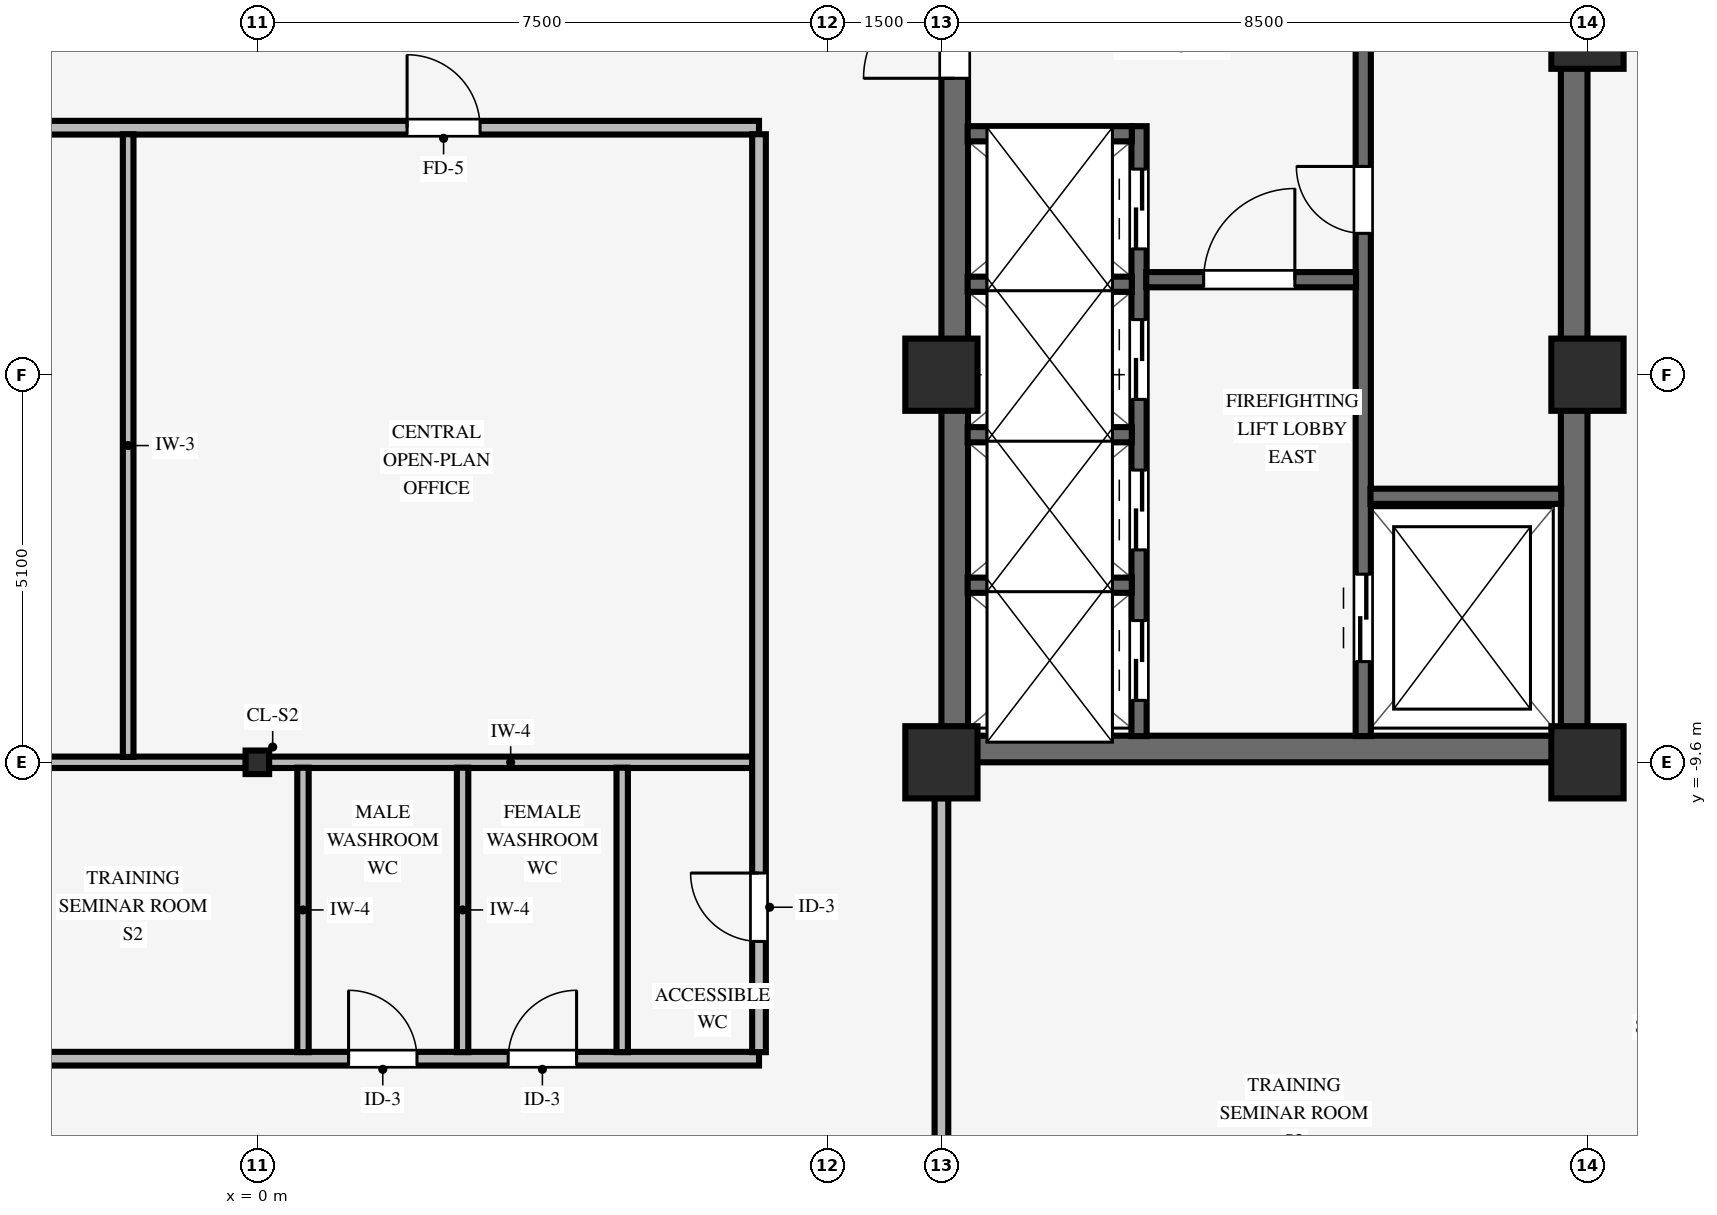
"""IFC4 building model, lengths in metres.
Left out: names, types, materials, properties, quantities, classifications, styles, units other than length and angle.
Written with IfcOpenShell. Run it as: python <this file> out.ifc"""

import sys

from ifc_helpers import new_model, si_unit, direction, frame, frame_2d, origin, origin_2d, place, context, subcontext, project, spatial, rectangle, i_section, extrude, source, transform, mapped, element, fill, save


model = new_model("IFC4")
c1 = context("Model", 3, precision=1e-05, world=origin(), true_north=direction((0.0, 1.0)))
c2 = subcontext(c1, "Body", "Model", "MODEL_VIEW")
j1 = project(units=[si_unit("LENGTHUNIT", "METRE"), si_unit("PLANEANGLEUNIT", "RADIAN")], contexts=[c1])
p1 = place(None, origin())
s1 = spatial("IfcSite", under=j1, at=p1, CompositionType="ELEMENT")
p2 = place(p1, origin())
s2 = spatial("IfcBuilding", under=s1, at=p2, CompositionType="ELEMENT")
p3 = place(p2, frame((0.0, 0.0, 212.8)))
s3 = spatial("IfcBuildingStorey", under=s2, at=p3, CompositionType="ELEMENT", Elevation=212.8)
p4 = place(p3, frame((9.0, -9.425, 0.0), z_axis=(0.0, 0.0, 1.0), x_axis=(1.0, 0.0, 0.0)))
e1 = element("IfcWall", 1, at=p4, inside=s3, PredefinedType="SHEAR", context=c2, shape_type="SweptSolid", body=[
    extrude(rectangle(XDim=8.5, YDim=0.35, at=frame_2d((4.25, 0.0))), origin(), (0.0, 0.0, 1.0), 3.37),
])
p5 = place(p3, frame((9.175, -9.255, 0.0), z_axis=(0.0, 0.0, 1.0), x_axis=(0.0, 1.0, 0.0)))
e2 = element("IfcWall", 2, at=p5, inside=s3, PredefinedType="SHEAR", context=c2, shape_type="SweptSolid", body=[
    extrude(rectangle(XDim=18.51, YDim=0.35, at=frame_2d((9.255, 0.0))), origin(), (0.0, 0.0, 1.0), 3.37),
])
p6 = place(p5, frame((8.655, 0.0, 0.0)))
e3 = element("IfcOpeningElement", 3, at=p6, cuts=e2, PredefinedType="OPENING", context=c2, shape_type="SweptSolid", body=[
    extrude(rectangle(XDim=1.2, YDim=2.15, at=frame_2d((0.6, 1.075))), frame((0.0, 0.185, 0.0), z_axis=(0.0, -1.0, 0.0), x_axis=(1.0, 0.0, 0.0)), (0.0, 0.0, 1.0), 0.37),
])
p7 = place(p3, frame((17.325, -9.255, 0.0), z_axis=(0.0, 0.0, 1.0), x_axis=(0.0, 1.0, 0.0)))
e4 = element("IfcWall", 4, at=p7, inside=s3, PredefinedType="SHEAR", context=c2, shape_type="SweptSolid", body=[
    extrude(rectangle(XDim=18.51, YDim=0.35, at=frame_2d((9.255, 0.0))), origin(), (0.0, 0.0, 1.0), 3.37),
])
for number, where, z_axis, x_axis in (
    (5, (9.0, -9.6, 0.0), (0.0, 0.0, 1.0), (1.0, 0.0, 0.0)),
    (6, (9.0, -4.5, 0.0), (0.0, 0.0, 1.0), (1.0, 0.0, 0.0)),
    (7, (17.5, -9.6, 0.0), (0.0, 0.0, 1.0), (1.0, 0.0, 0.0)),
    (8, (17.5, -4.5, 0.0), (0.0, 0.0, 1.0), (1.0, 0.0, 0.0)),
    (9, (17.5, 0.0, 0.0), (0.0, 0.0, 1.0), (1.0, 0.0, 0.0)),
):
    element("IfcColumn", number, at=place(p3, frame(where, z_axis=z_axis, x_axis=x_axis)), inside=s3, PredefinedType="COLUMN", context=c2, shape_type="SweptSolid", body=[
        extrude(rectangle(XDim=0.95, YDim=0.95, at=origin_2d()), origin(), (0.0, 0.0, 1.0), 3.37),
    ])
p8 = place(p3, frame((0.0, -9.6, 0.0), z_axis=(0.0, 0.0, 1.0), x_axis=(1.0, 0.0, 0.0)))
e10 = element("IfcColumn", 10, at=p8, inside=s3, PredefinedType="COLUMN", context=c2, shape_type="SweptSolid", body=[
    extrude(i_section(OverallWidth=0.31, OverallDepth=0.31, WebThickness=0.015, FlangeThickness=0.015, FilletRadius=0.015, at=origin_2d()), origin(), (0.0, 0.0, 1.0), 3.37),
])
p9 = place(p3, frame((14.55, -9.255, 0.0), z_axis=(0.0, 0.0, 1.0), x_axis=(0.0, 1.0, 0.0)))
e11 = element("IfcWall", 11, at=p9, inside=s3, PredefinedType="SHEAR", context=c2, shape_type="SweptSolid", body=[
    extrude(rectangle(XDim=10.16, YDim=0.2, at=frame_2d((5.08, 0.0))), origin(), (0.0, 0.0, 1.0), 3.37),
])
p10 = place(p9, frame((6.615, 0.0, 0.0)))
e12 = element("IfcOpeningElement", 12, at=p10, cuts=e11, PredefinedType="OPENING", context=c2, shape_type="SweptSolid", body=[
    extrude(rectangle(XDim=0.88, YDim=2.1, at=frame_2d((0.44, 1.05))), frame((0.0, 0.11, 0.0), z_axis=(0.0, -1.0, 0.0), x_axis=(1.0, 0.0, 0.0)), (0.0, 0.0, 1.0), 0.22),
])
p11 = place(p9, frame((0.98, 0.0, 0.0)))
e13 = element("IfcOpeningElement", 13, at=p11, cuts=e11, PredefinedType="OPENING", context=c2, shape_type="SweptSolid", body=[
    extrude(rectangle(XDim=1.15, YDim=2.15, at=frame_2d((0.575, 1.075))), frame((0.0, 0.11, 0.0), z_axis=(0.0, -1.0, 0.0), x_axis=(1.0, 0.0, 0.0)), (0.0, 0.0, 1.0), 0.22),
])
p12 = place(p3, frame((14.645, -6.1, 0.0), z_axis=(0.0, 0.0, 1.0), x_axis=(1.0, 0.0, 0.0)))
e14 = element("IfcWall", 14, at=p12, inside=s3, PredefinedType="SHEAR", context=c2, shape_type="SweptSolid", body=[
    extrude(rectangle(XDim=2.51, YDim=0.2, at=frame_2d((1.255, 0.0))), origin(), (0.0, 0.0, 1.0), 3.37),
])
p13 = place(p3, frame((11.6, -9.255, 0.0), z_axis=(0.0, 0.0, 1.0), x_axis=(0.0, 1.0, 0.0)))
e15 = element("IfcWall", 15, at=p13, inside=s3, PredefinedType="SHEAR", context=c2, shape_type="SweptSolid", body=[
    extrude(rectangle(XDim=8.025, YDim=0.2, at=frame_2d((4.012, 0.0))), origin(), (0.0, 0.0, 1.0), 3.37),
])
p14 = place(p13, frame((0.47, 0.0, 0.0)))
e16 = element("IfcOpeningElement", 16, at=p14, cuts=e15, PredefinedType="OPENING", context=c2, shape_type="SweptSolid", body=[
    extrude(rectangle(XDim=1.05, YDim=2.15, at=frame_2d((0.525, 1.075))), frame((0.0, 0.11, 0.0), z_axis=(0.0, -1.0, 0.0), x_axis=(1.0, 0.0, 0.0)), (0.0, 0.0, 1.0), 0.22),
])
p15 = place(p13, frame((2.45, 0.0, 0.0)))
e17 = element("IfcOpeningElement", 17, at=p15, cuts=e15, PredefinedType="OPENING", context=c2, shape_type="SweptSolid", body=[
    extrude(rectangle(XDim=1.05, YDim=2.15, at=frame_2d((0.525, 1.075))), frame((0.0, 0.11, 0.0), z_axis=(0.0, -1.0, 0.0), x_axis=(1.0, 0.0, 0.0)), (0.0, 0.0, 1.0), 0.22),
])
p16 = place(p13, frame((4.43, 0.0, 0.0)))
e18 = element("IfcOpeningElement", 18, at=p16, cuts=e15, PredefinedType="OPENING", context=c2, shape_type="SweptSolid", body=[
    extrude(rectangle(XDim=1.05, YDim=2.15, at=frame_2d((0.525, 1.075))), frame((0.0, 0.11, 0.0), z_axis=(0.0, -1.0, 0.0), x_axis=(1.0, 0.0, 0.0)), (0.0, 0.0, 1.0), 0.22),
])
p17 = place(p13, frame((6.41, 0.0, 0.0)))
e19 = element("IfcOpeningElement", 19, at=p17, cuts=e15, PredefinedType="OPENING", context=c2, shape_type="SweptSolid", body=[
    extrude(rectangle(XDim=1.05, YDim=2.15, at=frame_2d((0.525, 1.075))), frame((0.0, 0.11, 0.0), z_axis=(0.0, -1.0, 0.0), x_axis=(1.0, 0.0, 0.0)), (0.0, 0.0, 1.0), 0.22),
])
p18 = place(p3, frame((11.695, -3.25, 0.0), z_axis=(0.0, 0.0, 1.0), x_axis=(1.0, 0.0, 0.0)))
e20 = element("IfcWall", 20, at=p18, inside=s3, PredefinedType="SHEAR", context=c2, shape_type="SweptSolid", body=[
    extrude(rectangle(XDim=2.76, YDim=0.2, at=frame_2d((1.38, 0.0))), origin(), (0.0, 0.0, 1.0), 3.37),
])
p19 = place(p18, frame((0.755, 0.0, 0.0)))
e21 = element("IfcOpeningElement", 21, at=p19, cuts=e20, PredefinedType="OPENING", context=c2, shape_type="SweptSolid", body=[
    extrude(rectangle(XDim=1.2, YDim=2.15, at=frame_2d((0.6, 1.075))), frame((0.0, 0.11, 0.0), z_axis=(0.0, -1.0, 0.0), x_axis=(1.0, 0.0, 0.0)), (0.0, 0.0, 1.0), 0.22),
])
for number, where, z_axis, x_axis in (
    (22, (9.345, -7.27, 0.0), (0.0, 0.0, 1.0), (1.0, 0.0, 0.0)),
    (23, (9.345, -5.29, 0.0), (0.0, 0.0, 1.0), (1.0, 0.0, 0.0)),
    (24, (9.345, -3.31, 0.0), (0.0, 0.0, 1.0), (1.0, 0.0, 0.0)),
    (25, (9.345, -1.33, 0.0), (0.0, 0.0, 1.0), (1.0, 0.0, 0.0)),
):
    element("IfcWall", number, at=place(p3, frame(where, z_axis=z_axis, x_axis=x_axis)), inside=s3, PredefinedType="SHEAR", context=c2, shape_type="SweptSolid", body=[
        extrude(rectangle(XDim=2.16, YDim=0.2, at=frame_2d((1.08, 0.0))), origin(), (0.0, 0.0, 1.0), 3.37),
    ])
p20 = place(p3, frame((-17.7, -13.5, 0.0), z_axis=(0.0, 0.0, 1.0), x_axis=(1.0, 0.0, 0.0)))
e26 = element("IfcWall", 26, at=p20, inside=s3, PredefinedType="PARTITIONING", context=c2, shape_type="SweptSolid", body=[
    extrude(rectangle(XDim=24.3, YDim=0.18, at=frame_2d((12.15, 0.0))), origin(), (0.0, 0.0, 1.0), 3.008),
])
p21 = place(p20, frame((12.215, 0.0, 0.0)))
e27 = element("IfcOpeningElement", 27, at=p21, cuts=e26, PredefinedType="OPENING", context=c2, shape_type="SweptSolid", body=[
    extrude(rectangle(XDim=0.96, YDim=2.1, at=frame_2d((0.48, 1.05))), frame((0.0, 0.1, 0.0), z_axis=(0.0, -1.0, 0.0), x_axis=(1.0, 0.0, 0.0)), (0.0, 0.0, 1.0), 0.2),
])
p22 = place(p20, frame((3.065, 0.0, 0.0)))
e28 = element("IfcOpeningElement", 28, at=p22, cuts=e26, PredefinedType="OPENING", context=c2, shape_type="SweptSolid", body=[
    extrude(rectangle(XDim=0.96, YDim=2.1, at=frame_2d((0.48, 1.05))), frame((0.0, 0.1, 0.0), z_axis=(0.0, -1.0, 0.0), x_axis=(1.0, 0.0, 0.0)), (0.0, 0.0, 1.0), 0.2),
])
p23 = place(p20, frame((18.9, 0.0, 0.0)))
e29 = element("IfcOpeningElement", 29, at=p23, cuts=e26, PredefinedType="OPENING", context=c2, shape_type="SweptSolid", body=[
    extrude(rectangle(XDim=0.9, YDim=2.1, at=frame_2d((0.45, 1.05))), frame((0.0, 0.1, 0.0), z_axis=(0.0, -1.0, 0.0), x_axis=(1.0, 0.0, 0.0)), (0.0, 0.0, 1.0), 0.2),
])
p24 = place(p20, frame((21.0, 0.0, 0.0)))
e30 = element("IfcOpeningElement", 30, at=p24, cuts=e26, PredefinedType="OPENING", context=c2, shape_type="SweptSolid", body=[
    extrude(rectangle(XDim=0.9, YDim=2.1, at=frame_2d((0.45, 1.05))), frame((0.0, 0.1, 0.0), z_axis=(0.0, -1.0, 0.0), x_axis=(1.0, 0.0, 0.0)), (0.0, 0.0, 1.0), 0.2),
])
p25 = place(p3, frame((-8.529, -9.6, 0.0), z_axis=(0.0, 0.0, 1.0), x_axis=(1.0, 0.0, 0.0)))
e31 = element("IfcWall", 31, at=p25, inside=s3, PredefinedType="PARTITIONING", context=c2, shape_type="SweptSolid", body=[
    extrude(rectangle(XDim=8.378, YDim=0.15, at=frame_2d((4.189, 0.0))), origin(), (0.0, 0.0, 1.0), 2.405),
])
p26 = place(p3, frame((0.151, -9.6, 0.0), z_axis=(0.0, 0.0, 1.0), x_axis=(1.0, 0.0, 0.0)))
e32 = element("IfcWall", 32, at=p26, inside=s3, PredefinedType="PARTITIONING", context=c2, shape_type="SweptSolid", body=[
    extrude(rectangle(XDim=6.363, YDim=0.15, at=frame_2d((3.182, 0.0))), origin(), (0.0, 0.0, 1.0), 2.405),
])
p27 = place(p3, frame((-9.0, -1.25, 0.0), z_axis=(0.0, 0.0, 1.0), x_axis=(1.0, 0.0, 0.0)))
e33 = element("IfcWall", 33, at=p27, inside=s3, PredefinedType="PARTITIONING", context=c2, shape_type="SweptSolid", body=[
    extrude(rectangle(XDim=15.6, YDim=0.18, at=frame_2d((7.8, 0.0))), origin(), (0.0, 0.0, 1.0), 3.36),
])
p28 = place(p27, frame((10.97, 0.0, 0.0)))
e34 = element("IfcOpeningElement", 34, at=p28, cuts=e33, PredefinedType="OPENING", context=c2, shape_type="SweptSolid", body=[
    extrude(rectangle(XDim=0.96, YDim=2.1, at=frame_2d((0.48, 1.05))), frame((0.0, 0.1, 0.0), z_axis=(0.0, -1.0, 0.0), x_axis=(1.0, 0.0, 0.0)), (0.0, 0.0, 1.0), 0.2),
])
p29 = place(p27, frame((3.17, 0.0, 0.0)))
e35 = element("IfcOpeningElement", 35, at=p29, cuts=e33, PredefinedType="OPENING", context=c2, shape_type="SweptSolid", body=[
    extrude(rectangle(XDim=0.96, YDim=2.1, at=frame_2d((0.48, 1.05))), frame((0.0, 0.1, 0.0), z_axis=(0.0, -1.0, 0.0), x_axis=(1.0, 0.0, 0.0)), (0.0, 0.0, 1.0), 0.2),
])
p30 = place(p3, frame((-1.7, -9.529, 0.0), z_axis=(0.0, 0.0, 1.0), x_axis=(0.0, 1.0, 0.0)))
e36 = element("IfcWall", 36, at=p30, inside=s3, PredefinedType="PARTITIONING", context=c2, shape_type="SweptSolid", body=[
    extrude(rectangle(XDim=8.193, YDim=0.14, at=frame_2d((4.097, 0.0))), origin(), (0.0, 0.0, 1.0), 3.36),
])
for number, where, z_axis, x_axis in (
    (37, (0.6, -13.414, 0.0), (0.0, 0.0, 1.0), (0.0, 1.0, 0.0)),
    (38, (2.7, -13.414, 0.0), (0.0, 0.0, 1.0), (0.0, 1.0, 0.0)),
    (39, (4.8, -13.414, 0.0), (0.0, 0.0, 1.0), (0.0, 1.0, 0.0)),
):
    element("IfcWall", number, at=place(p3, frame(where, z_axis=z_axis, x_axis=x_axis)), inside=s3, PredefinedType="PARTITIONING", context=c2, shape_type="SweptSolid", body=[
        extrude(rectangle(XDim=3.743, YDim=0.15, at=frame_2d((1.872, 0.0))), origin(), (0.0, 0.0, 1.0), 3.36),
    ])
p31 = place(p3, frame((6.6, -13.414, 0.0), z_axis=(0.0, 0.0, 1.0), x_axis=(0.0, 1.0, 0.0)))
e40 = element("IfcWall", 40, at=p31, inside=s3, PredefinedType="PARTITIONING", context=c2, shape_type="SweptSolid", body=[
    extrude(rectangle(XDim=12.078, YDim=0.18, at=frame_2d((6.039, 0.0))), origin(), (0.0, 0.0, 1.0), 3.36),
])
p32 = place(p31, frame((1.457, 0.0, 0.0)))
e41 = element("IfcOpeningElement", 41, at=p32, cuts=e40, PredefinedType="OPENING", context=c2, shape_type="SweptSolid", body=[
    extrude(rectangle(XDim=0.9, YDim=2.1, at=frame_2d((0.45, 1.05))), frame((0.0, 0.1, 0.0), z_axis=(0.0, -1.0, 0.0), x_axis=(1.0, 0.0, 0.0)), (0.0, 0.0, 1.0), 0.2),
])
p33 = place(p3, frame((9.0, -15.814, 0.0), z_axis=(0.0, 0.0, 1.0), x_axis=(0.0, 1.0, 0.0)))
e42 = element("IfcWall", 42, at=p33, inside=s3, PredefinedType="PARTITIONING", context=c2, shape_type="SweptSolid", body=[
    extrude(rectangle(XDim=5.743, YDim=0.18, at=frame_2d((2.872, 0.0))), origin(), (0.0, 0.0, 1.0), 2.816),
])
m1 = source(origin(), c2, "Body", "SweptSolid", [
    extrude(rectangle(XDim=0.88, YDim=2.1, at=frame_2d((0.44, 1.05))), frame((0.0, 0.025, 0.0), z_axis=(0.0, -1.0, 0.0), x_axis=(1.0, 0.0, 0.0)), (0.0, 0.0, 1.0), 0.05),
])
p34 = place(p10, origin())
e43 = element("IfcDoor", 43, at=p34, inside=s3, OperationType="SINGLE_SWING_RIGHT", PredefinedType="DOOR", context=c2, shape_type="MappedRepresentation", body=[
    mapped(m1, transform((0.0, 0.0, 0.0), scale=1.0)),
])
fill(e12, e43)
m2 = source(origin(), c2, "Body", "SweptSolid", [
    extrude(rectangle(XDim=1.2, YDim=2.15, at=frame_2d((0.6, 1.075))), frame((0.0, 0.025, 0.0), z_axis=(0.0, -1.0, 0.0), x_axis=(1.0, 0.0, 0.0)), (0.0, 0.0, 1.0), 0.05),
])
p35 = place(p19, origin())
e44 = element("IfcDoor", 44, at=p35, inside=s3, OperationType="SINGLE_SWING_RIGHT", PredefinedType="DOOR", context=c2, shape_type="MappedRepresentation", body=[
    mapped(m2, transform((0.0, 0.0, 0.0), scale=1.0)),
])
fill(e21, e44)
p36 = place(p6, origin())
e45 = element("IfcDoor", 45, at=p36, inside=s3, OperationType="SINGLE_SWING_LEFT", PredefinedType="DOOR", context=c2, shape_type="MappedRepresentation", body=[
    mapped(m2, transform((0.0, 0.0, 0.0), scale=1.0)),
])
fill(e3, e45)
m3 = source(origin(), c2, "Body", "SweptSolid", [
    extrude(rectangle(XDim=1.15, YDim=2.15, at=frame_2d((0.575, 1.075))), frame((0.0, 0.025, 0.0), z_axis=(0.0, -1.0, 0.0), x_axis=(1.0, 0.0, 0.0)), (0.0, 0.0, 1.0), 0.05),
])
p37 = place(p11, origin())
e46 = element("IfcDoor", 46, at=p37, inside=s3, OperationType="DOUBLE_DOOR_SLIDING", PredefinedType="DOOR", context=c2, shape_type="MappedRepresentation", body=[
    mapped(m3, transform((0.0, 0.0, 0.0), scale=1.0)),
])
fill(e13, e46)
m4 = source(origin(), c2, "Body", "SweptSolid", [
    extrude(rectangle(XDim=1.05, YDim=2.15, at=frame_2d((0.525, 1.075))), frame((0.0, 0.025, 0.0), z_axis=(0.0, -1.0, 0.0), x_axis=(1.0, 0.0, 0.0)), (0.0, 0.0, 1.0), 0.05),
])
p38 = place(p14, origin())
e47 = element("IfcDoor", 47, at=p38, inside=s3, OperationType="DOUBLE_DOOR_SLIDING", PredefinedType="DOOR", context=c2, shape_type="MappedRepresentation", body=[
    mapped(m4, transform((0.0, 0.0, 0.0), scale=1.0)),
])
fill(e16, e47)
p39 = place(p15, origin())
e48 = element("IfcDoor", 48, at=p39, inside=s3, OperationType="DOUBLE_DOOR_SLIDING", PredefinedType="DOOR", context=c2, shape_type="MappedRepresentation", body=[
    mapped(m4, transform((0.0, 0.0, 0.0), scale=1.0)),
])
fill(e17, e48)
p40 = place(p16, origin())
e49 = element("IfcDoor", 49, at=p40, inside=s3, OperationType="DOUBLE_DOOR_SLIDING", PredefinedType="DOOR", context=c2, shape_type="MappedRepresentation", body=[
    mapped(m4, transform((0.0, 0.0, 0.0), scale=1.0)),
])
fill(e18, e49)
p41 = place(p17, origin())
e50 = element("IfcDoor", 50, at=p41, inside=s3, OperationType="DOUBLE_DOOR_SLIDING", PredefinedType="DOOR", context=c2, shape_type="MappedRepresentation", body=[
    mapped(m4, transform((0.0, 0.0, 0.0), scale=1.0)),
])
fill(e19, e50)
m5 = source(origin(), c2, "Body", "SweptSolid", [
    extrude(rectangle(XDim=0.96, YDim=2.1, at=frame_2d((0.48, 1.05))), frame((0.0, 0.025, 0.0), z_axis=(0.0, -1.0, 0.0), x_axis=(1.0, 0.0, 0.0)), (0.0, 0.0, 1.0), 0.05),
])
p42 = place(p28, origin())
e51 = element("IfcDoor", 51, at=p42, inside=s3, OperationType="SINGLE_SWING_LEFT", PredefinedType="DOOR", context=c2, shape_type="MappedRepresentation", body=[
    mapped(m5, transform((0.0, 0.0, 0.0), scale=1.0)),
])
fill(e34, e51)
m6 = source(origin(), c2, "Body", "SweptSolid", [
    extrude(rectangle(XDim=0.9, YDim=2.1, at=frame_2d((0.45, 1.05))), frame((0.0, 0.025, 0.0), z_axis=(0.0, -1.0, 0.0), x_axis=(1.0, 0.0, 0.0)), (0.0, 0.0, 1.0), 0.05),
])
p43 = place(p32, origin())
e52 = element("IfcDoor", 52, at=p43, inside=s3, OperationType="SINGLE_SWING_RIGHT", PredefinedType="DOOR", context=c2, shape_type="MappedRepresentation", body=[
    mapped(m6, transform((0.0, 0.0, 0.0), scale=1.0)),
])
fill(e41, e52)
p44 = place(p23, origin())
e53 = element("IfcDoor", 53, at=p44, inside=s3, OperationType="SINGLE_SWING_LEFT", PredefinedType="DOOR", context=c2, shape_type="MappedRepresentation", body=[
    mapped(m6, transform((0.0, 0.0, 0.0), scale=1.0)),
])
fill(e29, e53)
p45 = place(p24, origin())
e54 = element("IfcDoor", 54, at=p45, inside=s3, OperationType="SINGLE_SWING_RIGHT", PredefinedType="DOOR", context=c2, shape_type="MappedRepresentation", body=[
    mapped(m6, transform((0.0, 0.0, 0.0), scale=1.0)),
])
fill(e30, e54)
save(model, sys.argv[1])
